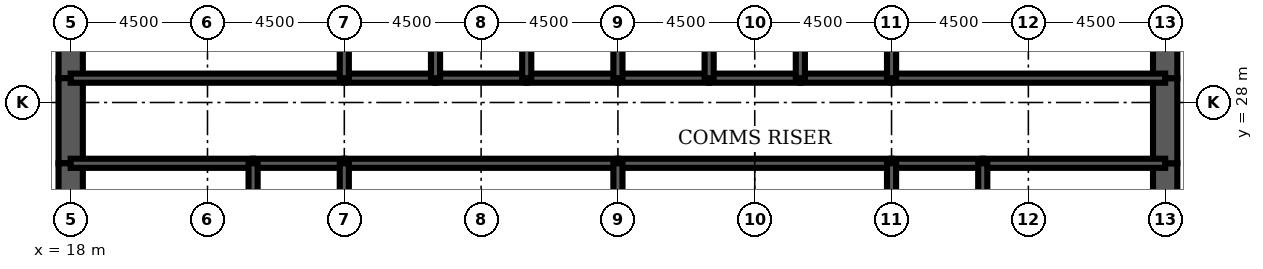
"""IFC4 building model, lengths in metres.
Left out: names, types, materials, properties, quantities, classifications, styles, units other than length and angle.
Written with IfcOpenShell. Run it as: python <this file> out.ifc"""

import sys

from ifc_helpers import new_model, si_unit, direction, frame, frame_2d, origin, place, context, subcontext, project, spatial, rectangle, extrude, element, fill, save


model = new_model("IFC4")
c1 = context("Model", 3, precision=1e-05, world=origin(), true_north=direction((0.0, 1.0)))
c2 = subcontext(c1, "Body", "Model", "MODEL_VIEW")
j1 = project(units=[si_unit("LENGTHUNIT", "METRE"), si_unit("PLANEANGLEUNIT", "RADIAN")], contexts=[c1])
p1 = place(None, origin())
s1 = spatial("IfcSite", under=j1, at=p1, CompositionType="ELEMENT")
p2 = place(p1, origin())
s2 = spatial("IfcBuilding", under=s1, at=p2, CompositionType="ELEMENT")
p3 = place(p2, frame((0.0, 0.0, 257.2)))
s3 = spatial("IfcBuildingStorey", under=s2, at=p3, CompositionType="ELEMENT", Elevation=257.2)
p4 = place(p3, frame((18.0, 32.0, 0.0), z_axis=(0.0, 0.0, 1.0), x_axis=(0.0, -1.0, 0.0)))
e1 = element("IfcWall", 1, at=p4, inside=s3, PredefinedType="SHEAR", context=c2, shape_type="SweptSolid", body=[
    extrude(rectangle(XDim=3.2, YDim=0.8, at=frame_2d((1.6, 0.0))), origin(), (0.0, 0.0, 1.0), 4.2),
])
p5 = place(p3, frame((18.0, 28.8, 0.0), z_axis=(0.0, 0.0, 1.0), x_axis=(0.0, -1.0, 0.0)))
e2 = element("IfcWall", 2, at=p5, inside=s3, PredefinedType="SHEAR", context=c2, shape_type="SweptSolid", body=[
    extrude(rectangle(XDim=2.8, YDim=0.8, at=frame_2d((1.4, 0.0))), origin(), (0.0, 0.0, 1.0), 4.2),
])
p6 = place(p5, frame((0.4, 0.0, 0.0)))
e3 = element("IfcOpeningElement", 3, at=p6, cuts=e2, PredefinedType="OPENING", context=c2, shape_type="SweptSolid", body=[
    extrude(rectangle(XDim=1.8, YDim=2.1, at=frame_2d((0.9, 1.05))), frame((0.0, 0.41, 0.0), z_axis=(0.0, -1.0, 0.0), x_axis=(1.0, 0.0, 0.0)), (0.0, 0.0, 1.0), 0.82),
])
for number, where, z_axis, x_axis in (
    (4, (18.0, 26.0, 0.0), (0.0, 0.0, 1.0), (0.0, -1.0, 0.0)),
    (5, (54.0, 22.0, 0.0), (0.0, 0.0, 1.0), (0.0, 1.0, 0.0)),
):
    element("IfcWall", number, at=place(p3, frame(where, z_axis=z_axis, x_axis=x_axis)), inside=s3, PredefinedType="SHEAR", context=c2, shape_type="SweptSolid", body=[
        extrude(rectangle(XDim=4.0, YDim=0.8, at=frame_2d((2.0, 0.0))), origin(), (0.0, 0.0, 1.0), 4.2),
    ])
p7 = place(p3, frame((54.0, 26.0, 0.0), z_axis=(0.0, 0.0, 1.0), x_axis=(0.0, 1.0, 0.0)))
e6 = element("IfcWall", 6, at=p7, inside=s3, PredefinedType="SHEAR", context=c2, shape_type="SweptSolid", body=[
    extrude(rectangle(XDim=2.8, YDim=0.8, at=frame_2d((1.4, 0.0))), origin(), (0.0, 0.0, 1.0), 4.2),
])
p8 = place(p7, frame((0.6, 0.0, 0.0)))
e7 = element("IfcOpeningElement", 7, at=p8, cuts=e6, PredefinedType="OPENING", context=c2, shape_type="SweptSolid", body=[
    extrude(rectangle(XDim=1.8, YDim=2.1, at=frame_2d((0.9, 1.05))), frame((0.0, 0.41, 0.0), z_axis=(0.0, -1.0, 0.0), x_axis=(1.0, 0.0, 0.0)), (0.0, 0.0, 1.0), 0.82),
])
p9 = place(p3, frame((54.0, 28.8, 0.0), z_axis=(0.0, 0.0, 1.0), x_axis=(0.0, 1.0, 0.0)))
e8 = element("IfcWall", 8, at=p9, inside=s3, PredefinedType="SHEAR", context=c2, shape_type="SweptSolid", body=[
    extrude(rectangle(XDim=3.2, YDim=0.8, at=frame_2d((1.6, 0.0))), origin(), (0.0, 0.0, 1.0), 4.2),
])
p10 = place(p3, frame((18.0, 28.8, 0.0), z_axis=(0.0, 0.0, 1.0), x_axis=(1.0, 0.0, 0.0)))
e9 = element("IfcWall", 9, at=p10, inside=s3, PredefinedType="SOLIDWALL", context=c2, shape_type="SweptSolid", body=[
    extrude(rectangle(XDim=9.0, YDim=0.3, at=frame_2d((4.5, 0.0))), origin(), (0.0, 0.0, 1.0), 4.2),
])
p11 = place(p10, frame((0.65, 0.0, 0.0)))
e10 = element("IfcOpeningElement", 10, at=p11, cuts=e9, PredefinedType="OPENING", context=c2, shape_type="SweptSolid", body=[
    extrude(rectangle(XDim=1.0, YDim=2.1, at=frame_2d((0.5, 1.05))), frame((0.0, 0.16, 0.0), z_axis=(0.0, -1.0, 0.0), x_axis=(1.0, 0.0, 0.0)), (0.0, 0.0, 1.0), 0.32),
])
p12 = place(p3, frame((27.0, 28.8, 0.0), z_axis=(0.0, 0.0, 1.0), x_axis=(1.0, 0.0, 0.0)))
e11 = element("IfcWall", 11, at=p12, inside=s3, PredefinedType="SOLIDWALL", context=c2, shape_type="SweptSolid", body=[
    extrude(rectangle(XDim=3.0, YDim=0.3, at=frame_2d((1.5, 0.0))), origin(), (0.0, 0.0, 1.0), 4.2),
])
p13 = place(p12, frame((0.95, 0.0, 0.0)))
e12 = element("IfcOpeningElement", 12, at=p13, cuts=e11, PredefinedType="OPENING", context=c2, shape_type="SweptSolid", body=[
    extrude(rectangle(XDim=1.1, YDim=2.2, at=frame_2d((0.55, 1.1))), frame((0.0, 0.16, 0.0), z_axis=(0.0, -1.0, 0.0), x_axis=(1.0, 0.0, 0.0)), (0.0, 0.0, 1.0), 0.32),
])
p14 = place(p3, frame((30.0, 28.8, 0.0), z_axis=(0.0, 0.0, 1.0), x_axis=(1.0, 0.0, 0.0)))
e13 = element("IfcWall", 13, at=p14, inside=s3, PredefinedType="SOLIDWALL", context=c2, shape_type="SweptSolid", body=[
    extrude(rectangle(XDim=3.0, YDim=0.3, at=frame_2d((1.5, 0.0))), origin(), (0.0, 0.0, 1.0), 4.2),
])
p15 = place(p14, frame((0.95, 0.0, 0.0)))
e14 = element("IfcOpeningElement", 14, at=p15, cuts=e13, PredefinedType="OPENING", context=c2, shape_type="SweptSolid", body=[
    extrude(rectangle(XDim=1.1, YDim=2.2, at=frame_2d((0.55, 1.1))), frame((0.0, 0.16, 0.0), z_axis=(0.0, -1.0, 0.0), x_axis=(1.0, 0.0, 0.0)), (0.0, 0.0, 1.0), 0.32),
])
p16 = place(p3, frame((33.0, 28.8, 0.0), z_axis=(0.0, 0.0, 1.0), x_axis=(1.0, 0.0, 0.0)))
e15 = element("IfcWall", 15, at=p16, inside=s3, PredefinedType="SOLIDWALL", context=c2, shape_type="SweptSolid", body=[
    extrude(rectangle(XDim=3.0, YDim=0.3, at=frame_2d((1.5, 0.0))), origin(), (0.0, 0.0, 1.0), 4.2),
])
p17 = place(p16, frame((0.95, 0.0, 0.0)))
e16 = element("IfcOpeningElement", 16, at=p17, cuts=e15, PredefinedType="OPENING", context=c2, shape_type="SweptSolid", body=[
    extrude(rectangle(XDim=1.1, YDim=2.2, at=frame_2d((0.55, 1.1))), frame((0.0, 0.16, 0.0), z_axis=(0.0, -1.0, 0.0), x_axis=(1.0, 0.0, 0.0)), (0.0, 0.0, 1.0), 0.32),
])
for number, where, z_axis, x_axis in (
    (17, (36.0, 28.8, 0.0), (0.0, 0.0, 1.0), (1.0, 0.0, 0.0)),
    (18, (39.0, 28.8, 0.0), (0.0, 0.0, 1.0), (1.0, 0.0, 0.0)),
):
    element("IfcWall", number, at=place(p3, frame(where, z_axis=z_axis, x_axis=x_axis)), inside=s3, PredefinedType="SOLIDWALL", context=c2, shape_type="SweptSolid", body=[
        extrude(rectangle(XDim=3.0, YDim=0.3, at=frame_2d((1.5, 0.0))), origin(), (0.0, 0.0, 1.0), 4.2),
    ])
p18 = place(p3, frame((42.0, 28.8, 0.0), z_axis=(0.0, 0.0, 1.0), x_axis=(1.0, 0.0, 0.0)))
e19 = element("IfcWall", 19, at=p18, inside=s3, PredefinedType="SOLIDWALL", context=c2, shape_type="SweptSolid", body=[
    extrude(rectangle(XDim=3.0, YDim=0.3, at=frame_2d((1.5, 0.0))), origin(), (0.0, 0.0, 1.0), 4.2),
])
p19 = place(p18, frame((0.95, 0.0, 0.0)))
e20 = element("IfcOpeningElement", 20, at=p19, cuts=e19, PredefinedType="OPENING", context=c2, shape_type="SweptSolid", body=[
    extrude(rectangle(XDim=1.1, YDim=2.2, at=frame_2d((0.55, 1.1))), frame((0.0, 0.16, 0.0), z_axis=(0.0, -1.0, 0.0), x_axis=(1.0, 0.0, 0.0)), (0.0, 0.0, 1.0), 0.32),
])
p20 = place(p3, frame((45.0, 28.8, 0.0), z_axis=(0.0, 0.0, 1.0), x_axis=(1.0, 0.0, 0.0)))
e21 = element("IfcWall", 21, at=p20, inside=s3, PredefinedType="SOLIDWALL", context=c2, shape_type="SweptSolid", body=[
    extrude(rectangle(XDim=9.0, YDim=0.3, at=frame_2d((4.5, 0.0))), origin(), (0.0, 0.0, 1.0), 4.2),
])
p21 = place(p20, frame((7.35, 0.0, 0.0)))
e22 = element("IfcOpeningElement", 22, at=p21, cuts=e21, PredefinedType="OPENING", context=c2, shape_type="SweptSolid", body=[
    extrude(rectangle(XDim=1.0, YDim=2.1, at=frame_2d((0.5, 1.05))), frame((0.0, 0.16, 0.0), z_axis=(0.0, -1.0, 0.0), x_axis=(1.0, 0.0, 0.0)), (0.0, 0.0, 1.0), 0.32),
])
p22 = place(p3, frame((18.0, 26.0, 0.0), z_axis=(0.0, 0.0, 1.0), x_axis=(1.0, 0.0, 0.0)))
e23 = element("IfcWall", 23, at=p22, inside=s3, PredefinedType="SOLIDWALL", context=c2, shape_type="SweptSolid", body=[
    extrude(rectangle(XDim=6.0, YDim=0.3, at=frame_2d((3.0, 0.0))), origin(), (0.0, 0.0, 1.0), 4.2),
])
p23 = place(p3, frame((24.0, 26.0, 0.0), z_axis=(0.0, 0.0, 1.0), x_axis=(1.0, 0.0, 0.0)))
e24 = element("IfcWall", 24, at=p23, inside=s3, PredefinedType="SOLIDWALL", context=c2, shape_type="SweptSolid", body=[
    extrude(rectangle(XDim=3.0, YDim=0.3, at=frame_2d((1.5, 0.0))), origin(), (0.0, 0.0, 1.0), 4.2),
])
for number, where, z_axis, x_axis in (
    (25, (27.0, 26.0, 0.0), (0.0, 0.0, 1.0), (1.0, 0.0, 0.0)),
    (26, (36.0, 26.0, 0.0), (0.0, 0.0, 1.0), (1.0, 0.0, 0.0)),
):
    element("IfcWall", number, at=place(p3, frame(where, z_axis=z_axis, x_axis=x_axis)), inside=s3, PredefinedType="SOLIDWALL", context=c2, shape_type="SweptSolid", body=[
        extrude(rectangle(XDim=9.0, YDim=0.3, at=frame_2d((4.5, 0.0))), origin(), (0.0, 0.0, 1.0), 4.2),
    ])
p24 = place(p3, frame((45.0, 26.0, 0.0), z_axis=(0.0, 0.0, 1.0), x_axis=(1.0, 0.0, 0.0)))
e27 = element("IfcWall", 27, at=p24, inside=s3, PredefinedType="SOLIDWALL", context=c2, shape_type="SweptSolid", body=[
    extrude(rectangle(XDim=3.0, YDim=0.3, at=frame_2d((1.5, 0.0))), origin(), (0.0, 0.0, 1.0), 4.2),
])
p25 = place(p3, frame((48.0, 26.0, 0.0), z_axis=(0.0, 0.0, 1.0), x_axis=(1.0, 0.0, 0.0)))
e28 = element("IfcWall", 28, at=p25, inside=s3, PredefinedType="SOLIDWALL", context=c2, shape_type="SweptSolid", body=[
    extrude(rectangle(XDim=6.0, YDim=0.3, at=frame_2d((3.0, 0.0))), origin(), (0.0, 0.0, 1.0), 4.2),
])
for number, where, z_axis, x_axis in (
    (29, (27.0, 28.8, 0.0), (0.0, 0.0, 1.0), (0.0, 1.0, 0.0)),
    (30, (30.0, 28.8, 0.0), (0.0, 0.0, 1.0), (0.0, 1.0, 0.0)),
    (31, (33.0, 28.8, 0.0), (0.0, 0.0, 1.0), (0.0, 1.0, 0.0)),
    (32, (36.0, 28.8, 0.0), (0.0, 0.0, 1.0), (0.0, 1.0, 0.0)),
    (33, (39.0, 28.8, 0.0), (0.0, 0.0, 1.0), (0.0, 1.0, 0.0)),
    (34, (42.0, 28.8, 0.0), (0.0, 0.0, 1.0), (0.0, 1.0, 0.0)),
    (35, (45.0, 28.8, 0.0), (0.0, 0.0, 1.0), (0.0, 1.0, 0.0)),
):
    element("IfcWall", number, at=place(p3, frame(where, z_axis=z_axis, x_axis=x_axis)), inside=s3, PredefinedType="SOLIDWALL", context=c2, shape_type="SweptSolid", body=[
        extrude(rectangle(XDim=3.2, YDim=0.3, at=frame_2d((1.6, 0.0))), origin(), (0.0, 0.0, 1.0), 4.2),
    ])
for number, where, z_axis, x_axis in (
    (36, (24.0, 22.0, 0.0), (0.0, 0.0, 1.0), (0.0, 1.0, 0.0)),
    (37, (27.0, 22.0, 0.0), (0.0, 0.0, 1.0), (0.0, 1.0, 0.0)),
    (38, (36.0, 22.0, 0.0), (0.0, 0.0, 1.0), (0.0, 1.0, 0.0)),
    (39, (45.0, 22.0, 0.0), (0.0, 0.0, 1.0), (0.0, 1.0, 0.0)),
    (40, (48.0, 22.0, 0.0), (0.0, 0.0, 1.0), (0.0, 1.0, 0.0)),
):
    element("IfcWall", number, at=place(p3, frame(where, z_axis=z_axis, x_axis=x_axis)), inside=s3, PredefinedType="SOLIDWALL", context=c2, shape_type="SweptSolid", body=[
        extrude(rectangle(XDim=4.0, YDim=0.3, at=frame_2d((2.0, 0.0))), origin(), (0.0, 0.0, 1.0), 4.2),
    ])
p26 = place(p3, frame((38.0, 22.15, 0.0), z_axis=(0.0, 0.0, 1.0), x_axis=(0.0, 1.0, 0.0)))
e41 = element("IfcWall", 41, at=p26, inside=s3, PredefinedType="PARTITIONING", context=c2, shape_type="SweptSolid", body=[
    extrude(rectangle(XDim=3.7, YDim=0.15, at=frame_2d((1.85, 0.0))), origin(), (0.0, 0.0, 1.0), 3.0),
])
p27 = place(p26, frame((2.2, 0.0, 0.0)))
e42 = element("IfcOpeningElement", 42, at=p27, cuts=e41, PredefinedType="OPENING", context=c2, shape_type="SweptSolid", body=[
    extrude(rectangle(XDim=1.0, YDim=2.1, at=frame_2d((0.5, 1.05))), frame((0.0, 0.085, 0.0), z_axis=(0.0, -1.0, 0.0), x_axis=(1.0, 0.0, 0.0)), (0.0, 0.0, 1.0), 0.17),
])
for number, where, z_axis, x_axis in (
    (43, (20.275, 22.15, 0.0), (0.0, 0.0, 1.0), (0.0, 1.0, 0.0)),
    (44, (51.425, 22.15, 0.0), (0.0, 0.0, 1.0), (0.0, 1.0, 0.0)),
):
    element("IfcWall", number, at=place(p3, frame(where, z_axis=z_axis, x_axis=x_axis)), inside=s3, PredefinedType="PARTITIONING", context=c2, shape_type="SweptSolid", body=[
        extrude(rectangle(XDim=3.7, YDim=0.15, at=frame_2d((1.85, 0.0))), origin(), (0.0, 0.0, 1.0), 3.0),
    ])
p28 = place(p27, origin())
e45 = element("IfcDoor", 45, at=p28, inside=s3, OperationType="SINGLE_SWING_RIGHT", PredefinedType="DOOR", context=c2, shape_type="SweptSolid", body=[
    extrude(rectangle(XDim=1.0, YDim=2.1, at=frame_2d((0.5, 1.05))), frame((0.0, 0.025, 0.0), z_axis=(0.0, -1.0, 0.0), x_axis=(1.0, 0.0, 0.0)), (0.0, 0.0, 1.0), 0.05),
])
fill(e42, e45)
p29 = place(p19, origin())
e46 = element("IfcDoor", 46, at=p29, inside=s3, OperationType="DOUBLE_DOOR_SLIDING", PredefinedType="USERDEFINED", context=c2, shape_type="SweptSolid", body=[
    extrude(rectangle(XDim=1.1, YDim=2.2, at=frame_2d((0.55, 1.1))), frame((0.0, 0.025, 0.0), z_axis=(0.0, -1.0, 0.0), x_axis=(1.0, 0.0, 0.0)), (0.0, 0.0, 1.0), 0.05),
])
fill(e20, e46)
p30 = place(p13, origin())
e47 = element("IfcDoor", 47, at=p30, inside=s3, OperationType="DOUBLE_DOOR_SLIDING", PredefinedType="USERDEFINED", context=c2, shape_type="SweptSolid", body=[
    extrude(rectangle(XDim=1.1, YDim=2.2, at=frame_2d((0.55, 1.1))), frame((0.0, 0.025, 0.0), z_axis=(0.0, -1.0, 0.0), x_axis=(1.0, 0.0, 0.0)), (0.0, 0.0, 1.0), 0.05),
])
fill(e12, e47)
p31 = place(p15, origin())
e48 = element("IfcDoor", 48, at=p31, inside=s3, OperationType="DOUBLE_DOOR_SLIDING", PredefinedType="USERDEFINED", context=c2, shape_type="SweptSolid", body=[
    extrude(rectangle(XDim=1.1, YDim=2.2, at=frame_2d((0.55, 1.1))), frame((0.0, 0.025, 0.0), z_axis=(0.0, -1.0, 0.0), x_axis=(1.0, 0.0, 0.0)), (0.0, 0.0, 1.0), 0.05),
])
fill(e14, e48)
p32 = place(p17, origin())
e49 = element("IfcDoor", 49, at=p32, inside=s3, OperationType="DOUBLE_DOOR_SLIDING", PredefinedType="USERDEFINED", context=c2, shape_type="SweptSolid", body=[
    extrude(rectangle(XDim=1.1, YDim=2.2, at=frame_2d((0.55, 1.1))), frame((0.0, 0.025, 0.0), z_axis=(0.0, -1.0, 0.0), x_axis=(1.0, 0.0, 0.0)), (0.0, 0.0, 1.0), 0.05),
])
fill(e16, e49)
p33 = place(p11, origin())
e50 = element("IfcDoor", 50, at=p33, inside=s3, OperationType="SINGLE_SWING_LEFT", PredefinedType="DOOR", context=c2, shape_type="SweptSolid", body=[
    extrude(rectangle(XDim=1.0, YDim=2.1, at=frame_2d((0.5, 1.05))), frame((0.0, 0.025, 0.0), z_axis=(0.0, -1.0, 0.0), x_axis=(1.0, 0.0, 0.0)), (0.0, 0.0, 1.0), 0.05),
])
fill(e10, e50)
p34 = place(p21, origin())
e51 = element("IfcDoor", 51, at=p34, inside=s3, OperationType="SINGLE_SWING_RIGHT", PredefinedType="DOOR", context=c2, shape_type="SweptSolid", body=[
    extrude(rectangle(XDim=1.0, YDim=2.1, at=frame_2d((0.5, 1.05))), frame((0.0, 0.025, 0.0), z_axis=(0.0, -1.0, 0.0), x_axis=(1.0, 0.0, 0.0)), (0.0, 0.0, 1.0), 0.05),
])
fill(e22, e51)
p35 = place(p6, origin())
e52 = element("IfcDoor", 52, at=p35, inside=s3, OperationType="SINGLE_SWING_LEFT", PredefinedType="DOOR", context=c2, shape_type="SweptSolid", body=[
    extrude(rectangle(XDim=1.8, YDim=2.1, at=frame_2d((0.9, 1.05))), frame((0.0, 0.4, 0.0), z_axis=(0.0, -1.0, 0.0), x_axis=(1.0, 0.0, 0.0)), (0.0, 0.0, 1.0), 0.8),
])
fill(e3, e52)
p36 = place(p8, origin())
e53 = element("IfcDoor", 53, at=p36, inside=s3, OperationType="SINGLE_SWING_LEFT", PredefinedType="DOOR", context=c2, shape_type="SweptSolid", body=[
    extrude(rectangle(XDim=1.8, YDim=2.1, at=frame_2d((0.9, 1.05))), frame((0.0, 0.4, 0.0), z_axis=(0.0, -1.0, 0.0), x_axis=(1.0, 0.0, 0.0)), (0.0, 0.0, 1.0), 0.8),
])
fill(e7, e53)
save(model, sys.argv[1])
